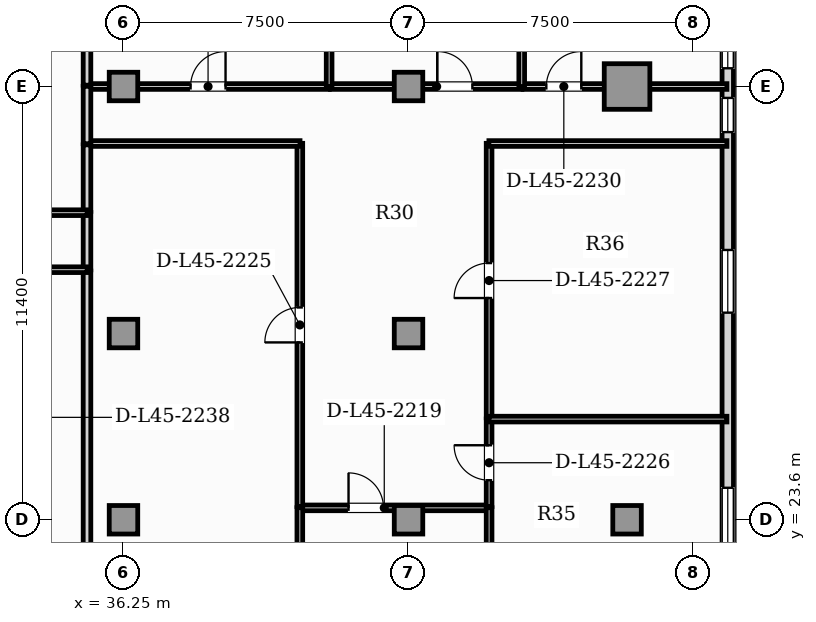
"""IFC4 building model, lengths in metres.
Left out: names, types, materials, properties, quantities, classifications, styles, units other than length and angle.
Written with IfcOpenShell. Run it as: python <this file> out.ifc"""

import sys

from ifc_helpers import new_model, si_unit, direction, frame, frame_2d, origin, origin_2d, place, context, subcontext, project, spatial, rectangle, hollow_rectangle, extrude, element, fill, save


model = new_model("IFC4")
c1 = context("Model", 3, precision=1e-05, world=origin(), true_north=direction((0.0, 1.0)))
c2 = subcontext(c1, "Body", "Model", "MODEL_VIEW")
j1 = project(units=[si_unit("LENGTHUNIT", "METRE"), si_unit("PLANEANGLEUNIT", "RADIAN")], contexts=[c1])
p1 = place(None, origin())
s1 = spatial("IfcSite", under=j1, at=p1, CompositionType="ELEMENT")
p2 = place(p1, origin())
s2 = spatial("IfcBuilding", under=s1, at=p2, CompositionType="ELEMENT")
p3 = place(p2, frame((0.0, 0.0, 183.7)))
s3 = spatial("IfcBuildingStorey", under=s2, at=p3, CompositionType="ELEMENT", Elevation=183.7)
p4 = place(p3, frame((49.5, 35.0, 0.0), z_axis=(0.0, 0.0, 1.0), x_axis=(1.0, 0.0, 0.0)))
e1 = element("IfcColumn", 1, at=p4, inside=s3, PredefinedType="USERDEFINED", context=c2, shape_type="SweptSolid", body=[
    extrude(hollow_rectangle(XDim=1.2, YDim=1.2, WallThickness=0.07, at=origin_2d()), origin(), (0.0, 0.0, 1.0), 3.85),
])
for number, where, z_axis, x_axis in (
    (2, (36.25, 23.6, 0.0), (0.0, 0.0, 1.0), (1.0, 0.0, 0.0)),
    (3, (43.75, 23.6, 0.0), (0.0, 0.0, 1.0), (1.0, 0.0, 0.0)),
    (4, (49.5, 23.6, 0.0), (0.0, 0.0, 1.0), (1.0, 0.0, 0.0)),
    (5, (36.25, 28.5, 0.0), (0.0, 0.0, 1.0), (1.0, 0.0, 0.0)),
    (6, (43.75, 28.5, 0.0), (0.0, 0.0, 1.0), (1.0, 0.0, 0.0)),
    (7, (36.25, 35.0, 0.0), (0.0, 0.0, 1.0), (1.0, 0.0, 0.0)),
    (8, (43.75, 35.0, 0.0), (0.0, 0.0, 1.0), (1.0, 0.0, 0.0)),
):
    element("IfcColumn", number, at=place(p3, frame(where, z_axis=z_axis, x_axis=x_axis)), inside=s3, PredefinedType="COLUMN", context=c2, shape_type="SweptSolid", body=[
        extrude(rectangle(XDim=0.75, YDim=0.75, at=origin_2d()), origin(), (0.0, 0.0, 1.0), 3.85),
    ])
p5 = place(p3, frame((52.15, 3.24, 0.0), z_axis=(0.0, 0.0, 1.0), x_axis=(0.0, 1.0, 0.0)))
e9 = element("IfcWall", 9, at=p5, inside=s3, PredefinedType="SOLIDWALL", context=c2, shape_type="SweptSolid", body=[
    extrude(rectangle(XDim=33.92, YDim=0.3, at=frame_2d((16.96, 0.0))), origin(), (0.0, 0.0, 1.0), 3.63),
])
p6 = place(p5, frame((30.56, 0.0, 0.95)))
e10 = element("IfcOpeningElement", 10, at=p6, cuts=e9, PredefinedType="OPENING", context=c2, shape_type="SweptSolid", body=[
    extrude(rectangle(XDim=0.9, YDim=1.5, at=frame_2d((0.45, 0.75))), frame((0.0, 0.16, 0.0), z_axis=(0.0, -1.0, 0.0), x_axis=(1.0, 0.0, 0.0)), (0.0, 0.0, 1.0), 0.32),
])
p7 = place(p5, frame((11.056, 0.0, 0.95)))
e11 = element("IfcOpeningElement", 11, at=p7, cuts=e9, PredefinedType="OPENING", context=c2, shape_type="SweptSolid", body=[
    extrude(rectangle(XDim=0.9, YDim=1.5, at=frame_2d((0.45, 0.75))), frame((0.0, 0.16, 0.0), z_axis=(0.0, -1.0, 0.0), x_axis=(1.0, 0.0, 0.0)), (0.0, 0.0, 1.0), 0.32),
])
p8 = place(p5, frame((14.288, 0.0, 0.88)))
e12 = element("IfcOpeningElement", 12, at=p8, cuts=e9, PredefinedType="OPENING", context=c2, shape_type="SweptSolid", body=[
    extrude(rectangle(XDim=1.65, YDim=2.0, at=frame_2d((0.825, 1.0))), frame((0.0, 0.16, 0.0), z_axis=(0.0, -1.0, 0.0), x_axis=(1.0, 0.0, 0.0)), (0.0, 0.0, 1.0), 0.32),
])
p9 = place(p5, frame((19.552, 0.0, 0.88)))
e13 = element("IfcOpeningElement", 13, at=p9, cuts=e9, PredefinedType="OPENING", context=c2, shape_type="SweptSolid", body=[
    extrude(rectangle(XDim=1.65, YDim=2.0, at=frame_2d((0.825, 1.0))), frame((0.0, 0.16, 0.0), z_axis=(0.0, -1.0, 0.0), x_axis=(1.0, 0.0, 0.0)), (0.0, 0.0, 1.0), 0.32),
])
p10 = place(p5, frame((25.809, 0.0, 0.88)))
e14 = element("IfcOpeningElement", 14, at=p10, cuts=e9, PredefinedType="OPENING", context=c2, shape_type="SweptSolid", body=[
    extrude(rectangle(XDim=1.65, YDim=2.0, at=frame_2d((0.825, 1.0))), frame((0.0, 0.16, 0.0), z_axis=(0.0, -1.0, 0.0), x_axis=(1.0, 0.0, 0.0)), (0.0, 0.0, 1.0), 0.32),
])
p11 = place(p5, frame((32.24, 0.0, 0.95)))
e15 = element("IfcOpeningElement", 15, at=p11, cuts=e9, PredefinedType="OPENING", context=c2, shape_type="SweptSolid", body=[
    extrude(rectangle(XDim=0.9, YDim=1.5, at=frame_2d((0.45, 0.75))), frame((0.0, 0.16, 0.0), z_axis=(0.0, -1.0, 0.0), x_axis=(1.0, 0.0, 0.0)), (0.0, 0.0, 1.0), 0.32),
])
p12 = place(p3, frame((40.885, 23.913, 0.0), z_axis=(0.0, 0.0, 1.0), x_axis=(1.0, 0.0, 0.0)))
e16 = element("IfcWall", 16, at=p12, inside=s3, PredefinedType="PARTITIONING", context=c2, shape_type="SweptSolid", body=[
    extrude(rectangle(XDim=4.99, YDim=0.15, at=frame_2d((2.495, 0.0))), origin(), (0.0, 0.0, 1.0), 3.63),
])
p13 = place(p12, frame((1.287, 0.0, 0.0)))
e17 = element("IfcOpeningElement", 17, at=p13, cuts=e16, PredefinedType="OPENING", context=c2, shape_type="SweptSolid", body=[
    extrude(rectangle(XDim=0.92, YDim=2.1, at=frame_2d((0.46, 1.05))), frame((0.0, 0.085, 0.0), z_axis=(0.0, -1.0, 0.0), x_axis=(1.0, 0.0, 0.0)), (0.0, 0.0, 1.0), 0.17),
])
p14 = place(p3, frame((40.89, 15.635, 0.0), z_axis=(0.0, 0.0, 1.0), x_axis=(0.0, 1.0, 0.0)))
e18 = element("IfcWall", 18, at=p14, inside=s3, PredefinedType="PARTITIONING", context=c2, shape_type="SweptSolid", body=[
    extrude(rectangle(XDim=8.283, YDim=0.15, at=frame_2d((4.142, 0.0))), origin(), (0.0, 0.0, 1.0), 3.63),
])
p15 = place(p14, frame((3.682, 0.0, 0.0)))
e19 = element("IfcOpeningElement", 19, at=p15, cuts=e18, PredefinedType="OPENING", context=c2, shape_type="SweptSolid", body=[
    extrude(rectangle(XDim=0.92, YDim=2.1, at=frame_2d((0.46, 1.05))), frame((0.0, 0.085, 0.0), z_axis=(0.0, -1.0, 0.0), x_axis=(1.0, 0.0, 0.0)), (0.0, 0.0, 1.0), 0.17),
])
p16 = place(p3, frame((45.87, 21.02, 0.0), z_axis=(0.0, 0.0, 1.0), x_axis=(0.0, 1.0, 0.0)))
e20 = element("IfcWall", 20, at=p16, inside=s3, PredefinedType="PARTITIONING", context=c2, shape_type="SweptSolid", body=[
    extrude(rectangle(XDim=2.898, YDim=0.15, at=frame_2d((1.449, 0.0))), origin(), (0.0, 0.0, 1.0), 3.63),
])
p17 = place(p16, frame((0.989, 0.0, 0.0)))
e21 = element("IfcOpeningElement", 21, at=p17, cuts=e20, PredefinedType="OPENING", context=c2, shape_type="SweptSolid", body=[
    extrude(rectangle(XDim=0.92, YDim=2.1, at=frame_2d((0.46, 1.05))), frame((0.0, 0.085, 0.0), z_axis=(0.0, -1.0, 0.0), x_axis=(1.0, 0.0, 0.0)), (0.0, 0.0, 1.0), 0.17),
])
p18 = place(p3, frame((40.89, 23.948, 0.0), z_axis=(0.0, 0.0, 1.0), x_axis=(0.0, 1.0, 0.0)))
e22 = element("IfcWall", 22, at=p18, inside=s3, PredefinedType="PARTITIONING", context=c2, shape_type="SweptSolid", body=[
    extrude(rectangle(XDim=9.557, YDim=0.15, at=frame_2d((4.778, 0.0))), origin(), (0.0, 0.0, 1.0), 3.63),
])
p19 = place(p18, frame((4.318, 0.0, 0.0)))
e23 = element("IfcOpeningElement", 23, at=p19, cuts=e22, PredefinedType="OPENING", context=c2, shape_type="SweptSolid", body=[
    extrude(rectangle(XDim=0.92, YDim=2.1, at=frame_2d((0.46, 1.05))), frame((0.0, 0.085, 0.0), z_axis=(0.0, -1.0, 0.0), x_axis=(1.0, 0.0, 0.0)), (0.0, 0.0, 1.0), 0.17),
])
p20 = place(p3, frame((35.285, 33.5, 0.0), z_axis=(0.0, 0.0, 1.0), x_axis=(1.0, 0.0, 0.0)))
e24 = element("IfcWall", 24, at=p20, inside=s3, PredefinedType="PARTITIONING", context=c2, shape_type="SweptSolid", body=[
    extrude(rectangle(XDim=5.61, YDim=0.15, at=frame_2d((2.805, 0.0))), origin(), (0.0, 0.0, 1.0), 3.63),
])
p21 = place(p3, frame((45.87, 23.948, 0.0), z_axis=(0.0, 0.0, 1.0), x_axis=(0.0, 1.0, 0.0)))
e25 = element("IfcWall", 25, at=p21, inside=s3, PredefinedType="PARTITIONING", context=c2, shape_type="SweptSolid", body=[
    extrude(rectangle(XDim=2.305, YDim=0.15, at=frame_2d((1.153, 0.0))), origin(), (0.0, 0.0, 1.0), 3.63),
])
p22 = place(p21, frame((0.693, 0.0, 0.0)))
e26 = element("IfcOpeningElement", 26, at=p22, cuts=e25, PredefinedType="OPENING", context=c2, shape_type="SweptSolid", body=[
    extrude(rectangle(XDim=0.92, YDim=2.1, at=frame_2d((0.46, 1.05))), frame((0.0, 0.085, 0.0), z_axis=(0.0, -1.0, 0.0), x_axis=(1.0, 0.0, 0.0)), (0.0, 0.0, 1.0), 0.17),
])
p23 = place(p3, frame((45.87, 26.284, 0.0), z_axis=(0.0, 0.0, 1.0), x_axis=(0.0, 1.0, 0.0)))
e27 = element("IfcWall", 27, at=p23, inside=s3, PredefinedType="PARTITIONING", context=c2, shape_type="SweptSolid", body=[
    extrude(rectangle(XDim=7.221, YDim=0.15, at=frame_2d((3.611, 0.0))), origin(), (0.0, 0.0, 1.0), 3.63),
])
p24 = place(p23, frame((3.151, 0.0, 0.0)))
e28 = element("IfcOpeningElement", 28, at=p24, cuts=e27, PredefinedType="OPENING", context=c2, shape_type="SweptSolid", body=[
    extrude(rectangle(XDim=0.92, YDim=2.1, at=frame_2d((0.46, 1.05))), frame((0.0, 0.085, 0.0), z_axis=(0.0, -1.0, 0.0), x_axis=(1.0, 0.0, 0.0)), (0.0, 0.0, 1.0), 0.17),
])
p25 = place(p3, frame((45.865, 33.5, 0.0), z_axis=(0.0, 0.0, 1.0), x_axis=(1.0, 0.0, 0.0)))
e29 = element("IfcWall", 29, at=p25, inside=s3, PredefinedType="PARTITIONING", context=c2, shape_type="SweptSolid", body=[
    extrude(rectangle(XDim=6.262, YDim=0.15, at=frame_2d((3.131, 0.0))), origin(), (0.0, 0.0, 1.0), 3.63),
])
p26 = place(p3, frame((35.285, 35.0, 0.0), z_axis=(0.0, 0.0, 1.0), x_axis=(1.0, 0.0, 0.0)))
e30 = element("IfcWall", 30, at=p26, inside=s3, PredefinedType="PARTITIONING", context=c2, shape_type="SweptSolid", body=[
    extrude(rectangle(XDim=6.381, YDim=0.15, at=frame_2d((3.19, 0.0))), origin(), (0.0, 0.0, 1.0), 3.013),
])
p27 = place(p26, frame((2.73, 0.0, 0.0)))
e31 = element("IfcOpeningElement", 31, at=p27, cuts=e30, PredefinedType="OPENING", context=c2, shape_type="SweptSolid", body=[
    extrude(rectangle(XDim=0.92, YDim=2.1, at=frame_2d((0.46, 1.05))), frame((0.0, 0.085, 0.0), z_axis=(0.0, -1.0, 0.0), x_axis=(1.0, 0.0, 0.0)), (0.0, 0.0, 1.0), 0.17),
])
p28 = place(p3, frame((41.696, 35.0, 0.0), z_axis=(0.0, 0.0, 1.0), x_axis=(1.0, 0.0, 0.0)))
e32 = element("IfcWall", 32, at=p28, inside=s3, PredefinedType="PARTITIONING", context=c2, shape_type="SweptSolid", body=[
    extrude(rectangle(XDim=5.038, YDim=0.15, at=frame_2d((2.519, 0.0))), origin(), (0.0, 0.0, 1.0), 3.013),
])
p29 = place(p28, frame((2.814, 0.0, 0.0)))
e33 = element("IfcOpeningElement", 33, at=p29, cuts=e32, PredefinedType="OPENING", context=c2, shape_type="SweptSolid", body=[
    extrude(rectangle(XDim=0.92, YDim=2.1, at=frame_2d((0.46, 1.05))), frame((0.0, 0.085, 0.0), z_axis=(0.0, -1.0, 0.0), x_axis=(1.0, 0.0, 0.0)), (0.0, 0.0, 1.0), 0.17),
])
p30 = place(p3, frame((46.763, 35.0, 0.0), z_axis=(0.0, 0.0, 1.0), x_axis=(1.0, 0.0, 0.0)))
e34 = element("IfcWall", 34, at=p30, inside=s3, PredefinedType="PARTITIONING", context=c2, shape_type="SweptSolid", body=[
    extrude(rectangle(XDim=5.364, YDim=0.15, at=frame_2d((2.682, 0.0))), origin(), (0.0, 0.0, 1.0), 3.013),
])
p31 = place(p30, frame((0.613, 0.0, 0.0)))
e35 = element("IfcOpeningElement", 35, at=p31, cuts=e34, PredefinedType="OPENING", context=c2, shape_type="SweptSolid", body=[
    extrude(rectangle(XDim=0.92, YDim=2.1, at=frame_2d((0.46, 1.05))), frame((0.0, 0.085, 0.0), z_axis=(0.0, -1.0, 0.0), x_axis=(1.0, 0.0, 0.0)), (0.0, 0.0, 1.0), 0.17),
])
p32 = place(p3, frame((35.29, 33.495, 0.0), z_axis=(0.0, 0.0, 1.0), x_axis=(0.0, 1.0, 0.0)))
e36 = element("IfcWall", 36, at=p32, inside=s3, PredefinedType="PARTITIONING", context=c2, shape_type="SweptSolid", body=[
    extrude(rectangle(XDim=1.51, YDim=0.2, at=frame_2d((0.755, 0.0))), origin(), (0.0, 0.0, 1.0), 3.63),
])
p33 = place(p3, frame((35.29, 30.175, 0.0), z_axis=(0.0, 0.0, 1.0), x_axis=(0.0, 1.0, 0.0)))
e37 = element("IfcWall", 37, at=p33, inside=s3, PredefinedType="PARTITIONING", context=c2, shape_type="SweptSolid", body=[
    extrude(rectangle(XDim=1.51, YDim=0.2, at=frame_2d((0.755, 0.0))), origin(), (0.0, 0.0, 1.0), 3.63),
])
p34 = place(p3, frame((35.29, 22.405, 0.0), z_axis=(0.0, 0.0, 1.0), x_axis=(0.0, 1.0, 0.0)))
e38 = element("IfcWall", 38, at=p34, inside=s3, PredefinedType="PARTITIONING", context=c2, shape_type="SweptSolid", body=[
    extrude(rectangle(XDim=7.74, YDim=0.2, at=frame_2d((3.87, 0.0))), origin(), (0.0, 0.0, 1.0), 3.63),
])
p35 = place(p3, frame((35.29, 31.715, 0.0), z_axis=(0.0, 0.0, 1.0), x_axis=(0.0, 1.0, 0.0)))
e39 = element("IfcWall", 39, at=p35, inside=s3, PredefinedType="PARTITIONING", context=c2, shape_type="SweptSolid", body=[
    extrude(rectangle(XDim=1.75, YDim=0.2, at=frame_2d((0.875, 0.0))), origin(), (0.0, 0.0, 1.0), 3.63),
])
p36 = place(p3, frame((45.865, 26.249, 0.0), z_axis=(0.0, 0.0, 1.0), x_axis=(1.0, 0.0, 0.0)))
e40 = element("IfcWall", 40, at=p36, inside=s3, PredefinedType="PARTITIONING", context=c2, shape_type="SweptSolid", body=[
    extrude(rectangle(XDim=6.262, YDim=0.15, at=frame_2d((3.131, 0.0))), origin(), (0.0, 0.0, 1.0), 3.63),
])
p37 = place(p3, frame((41.661, 34.995, 0.0), z_axis=(0.0, 0.0, 1.0), x_axis=(0.0, 1.0, 0.0)))
e41 = element("IfcWall", 41, at=p37, inside=s3, PredefinedType="PARTITIONING", context=c2, shape_type="SweptSolid", body=[
    extrude(rectangle(XDim=5.232, YDim=0.15, at=frame_2d((2.616, 0.0))), origin(), (0.0, 0.0, 1.0), 3.63),
])
p38 = place(p3, frame((35.29, 35.035, 0.0), z_axis=(0.0, 0.0, 1.0), x_axis=(0.0, 1.0, 0.0)))
e42 = element("IfcWall", 42, at=p38, inside=s3, PredefinedType="PARTITIONING", context=c2, shape_type="SweptSolid", body=[
    extrude(rectangle(XDim=1.798, YDim=0.2, at=frame_2d((0.899, 0.0))), origin(), (0.0, 0.0, 1.0), 3.63),
])
p39 = place(p3, frame((46.728, 34.995, 0.0), z_axis=(0.0, 0.0, 1.0), x_axis=(0.0, 1.0, 0.0)))
e43 = element("IfcWall", 43, at=p39, inside=s3, PredefinedType="PARTITIONING", context=c2, shape_type="SweptSolid", body=[
    extrude(rectangle(XDim=5.232, YDim=0.15, at=frame_2d((2.616, 0.0))), origin(), (0.0, 0.0, 1.0), 3.63),
])
p40 = place(p3, frame((31.181, 30.18, 0.0), z_axis=(0.0, 0.0, 1.0), x_axis=(1.0, 0.0, 0.0)))
e44 = element("IfcWall", 44, at=p40, inside=s3, PredefinedType="PARTITIONING", context=c2, shape_type="SweptSolid", body=[
    extrude(rectangle(XDim=4.114, YDim=0.15, at=frame_2d((2.057, 0.0))), origin(), (0.0, 0.0, 1.0), 3.63),
])
p41 = place(p3, frame((28.785, 31.68, 0.0), z_axis=(0.0, 0.0, 1.0), x_axis=(1.0, 0.0, 0.0)))
e45 = element("IfcWall", 45, at=p41, inside=s3, PredefinedType="PARTITIONING", context=c2, shape_type="SweptSolid", body=[
    extrude(rectangle(XDim=6.51, YDim=0.15, at=frame_2d((3.255, 0.0))), origin(), (0.0, 0.0, 1.0), 3.63),
])
p42 = place(p41, frame((2.795, 0.0, 0.0)))
e46 = element("IfcOpeningElement", 46, at=p42, cuts=e45, PredefinedType="OPENING", context=c2, shape_type="SweptSolid", body=[
    extrude(rectangle(XDim=0.92, YDim=2.1, at=frame_2d((0.46, 1.05))), frame((0.0, 0.085, 0.0), z_axis=(0.0, -1.0, 0.0), x_axis=(1.0, 0.0, 0.0)), (0.0, 0.0, 1.0), 0.17),
])
p43 = place(p6, origin())
e47 = element("IfcWindow", 47, at=p43, inside=s3, PartitioningType="SINGLE_PANEL", PredefinedType="WINDOW", context=c2, shape_type="SweptSolid", body=[
    extrude(rectangle(XDim=0.9, YDim=1.5, at=frame_2d((0.45, 0.75))), frame((0.0, 0.03, 0.0), z_axis=(0.0, -1.0, 0.0), x_axis=(1.0, 0.0, 0.0)), (0.0, 0.0, 1.0), 0.06),
])
fill(e10, e47)
p44 = place(p9, origin())
e48 = element("IfcWindow", 48, at=p44, inside=s3, PartitioningType="SINGLE_PANEL", PredefinedType="WINDOW", context=c2, shape_type="SweptSolid", body=[
    extrude(rectangle(XDim=1.65, YDim=2.0, at=frame_2d((0.825, 1.0))), frame((0.0, 0.03, 0.0), z_axis=(0.0, -1.0, 0.0), x_axis=(1.0, 0.0, 0.0)), (0.0, 0.0, 1.0), 0.06),
])
fill(e13, e48)
p45 = place(p10, origin())
e49 = element("IfcWindow", 49, at=p45, inside=s3, PartitioningType="SINGLE_PANEL", PredefinedType="WINDOW", context=c2, shape_type="SweptSolid", body=[
    extrude(rectangle(XDim=1.65, YDim=2.0, at=frame_2d((0.825, 1.0))), frame((0.0, 0.03, 0.0), z_axis=(0.0, -1.0, 0.0), x_axis=(1.0, 0.0, 0.0)), (0.0, 0.0, 1.0), 0.06),
])
fill(e14, e49)
p46 = place(p11, origin())
e50 = element("IfcWindow", 50, at=p46, inside=s3, PartitioningType="SINGLE_PANEL", PredefinedType="WINDOW", context=c2, shape_type="SweptSolid", body=[
    extrude(rectangle(XDim=0.9, YDim=1.5, at=frame_2d((0.45, 0.75))), frame((0.0, 0.03, 0.0), z_axis=(0.0, -1.0, 0.0), x_axis=(1.0, 0.0, 0.0)), (0.0, 0.0, 1.0), 0.06),
])
fill(e15, e50)
p47 = place(p13, origin())
e51 = element("IfcDoor", 51, at=p47, inside=s3, OperationType="SINGLE_SWING_LEFT", PredefinedType="DOOR", context=c2, shape_type="SweptSolid", body=[
    extrude(rectangle(XDim=0.92, YDim=2.1, at=frame_2d((0.46, 1.05))), frame((0.0, 0.025, 0.0), z_axis=(0.0, -1.0, 0.0), x_axis=(1.0, 0.0, 0.0)), (0.0, 0.0, 1.0), 0.05),
])
fill(e17, e51)
p48 = place(p19, origin())
e52 = element("IfcDoor", 52, at=p48, inside=s3, OperationType="SINGLE_SWING_LEFT", PredefinedType="DOOR", context=c2, shape_type="SweptSolid", body=[
    extrude(rectangle(XDim=0.92, YDim=2.1, at=frame_2d((0.46, 1.05))), frame((0.0, 0.025, 0.0), z_axis=(0.0, -1.0, 0.0), x_axis=(1.0, 0.0, 0.0)), (0.0, 0.0, 1.0), 0.05),
])
fill(e23, e52)
p49 = place(p22, origin())
e53 = element("IfcDoor", 53, at=p49, inside=s3, OperationType="SINGLE_SWING_RIGHT", PredefinedType="DOOR", context=c2, shape_type="SweptSolid", body=[
    extrude(rectangle(XDim=0.92, YDim=2.1, at=frame_2d((0.46, 1.05))), frame((0.0, 0.025, 0.0), z_axis=(0.0, -1.0, 0.0), x_axis=(1.0, 0.0, 0.0)), (0.0, 0.0, 1.0), 0.05),
])
fill(e26, e53)
p50 = place(p24, origin())
e54 = element("IfcDoor", 54, at=p50, inside=s3, OperationType="SINGLE_SWING_LEFT", PredefinedType="DOOR", context=c2, shape_type="SweptSolid", body=[
    extrude(rectangle(XDim=0.92, YDim=2.1, at=frame_2d((0.46, 1.05))), frame((0.0, 0.025, 0.0), z_axis=(0.0, -1.0, 0.0), x_axis=(1.0, 0.0, 0.0)), (0.0, 0.0, 1.0), 0.05),
])
fill(e28, e54)
p51 = place(p27, origin())
e55 = element("IfcDoor", 55, at=p51, inside=s3, OperationType="SINGLE_SWING_RIGHT", PredefinedType="DOOR", context=c2, shape_type="SweptSolid", body=[
    extrude(rectangle(XDim=0.92, YDim=2.1, at=frame_2d((0.46, 1.05))), frame((0.0, 0.025, 0.0), z_axis=(0.0, -1.0, 0.0), x_axis=(1.0, 0.0, 0.0)), (0.0, 0.0, 1.0), 0.05),
])
fill(e31, e55)
p52 = place(p29, origin())
e56 = element("IfcDoor", 56, at=p52, inside=s3, OperationType="SINGLE_SWING_LEFT", PredefinedType="DOOR", context=c2, shape_type="SweptSolid", body=[
    extrude(rectangle(XDim=0.92, YDim=2.1, at=frame_2d((0.46, 1.05))), frame((0.0, 0.025, 0.0), z_axis=(0.0, -1.0, 0.0), x_axis=(1.0, 0.0, 0.0)), (0.0, 0.0, 1.0), 0.05),
])
fill(e33, e56)
p53 = place(p31, origin())
e57 = element("IfcDoor", 57, at=p53, inside=s3, OperationType="SINGLE_SWING_RIGHT", PredefinedType="DOOR", context=c2, shape_type="SweptSolid", body=[
    extrude(rectangle(XDim=0.92, YDim=2.1, at=frame_2d((0.46, 1.05))), frame((0.0, 0.025, 0.0), z_axis=(0.0, -1.0, 0.0), x_axis=(1.0, 0.0, 0.0)), (0.0, 0.0, 1.0), 0.05),
])
fill(e35, e57)
save(model, sys.argv[1])
